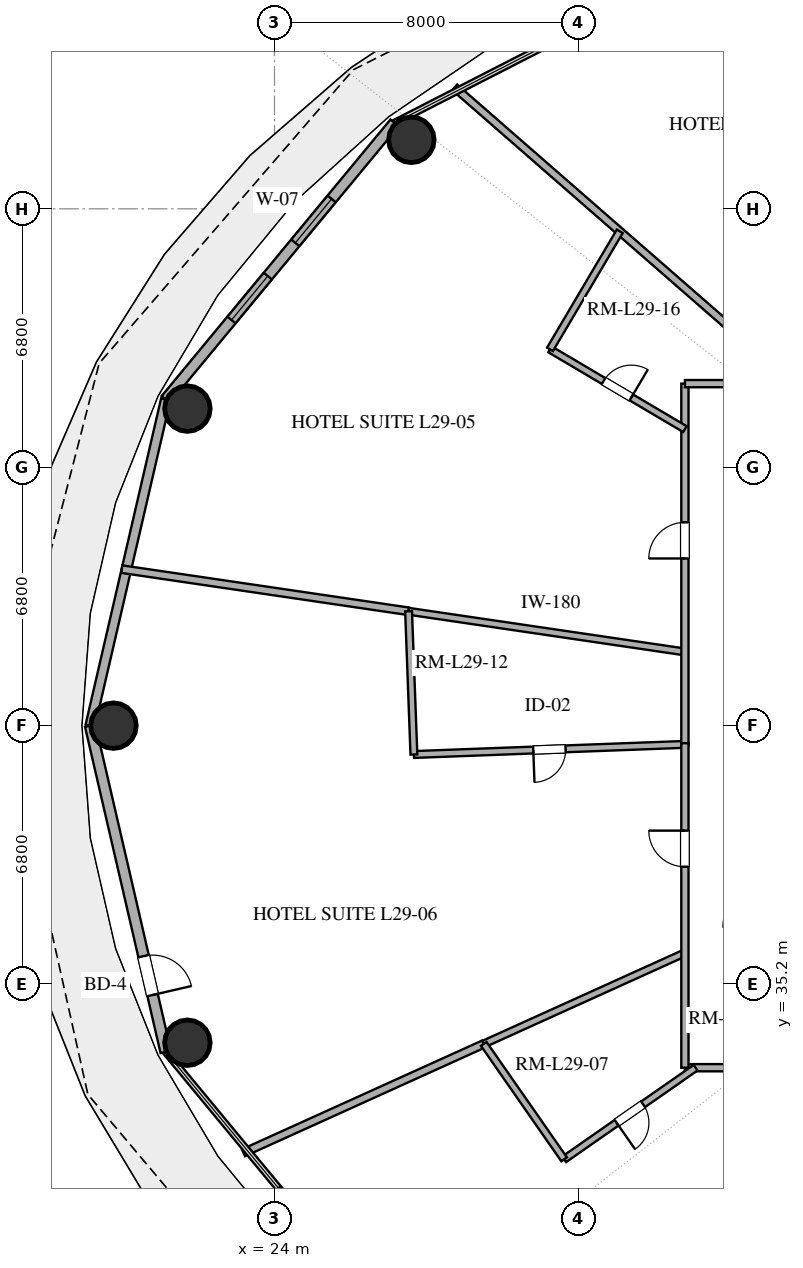
"""IFC4 building model, lengths in metres.
Left out: names, types, materials, properties, quantities, classifications, styles, units other than length and angle.
Written with IfcOpenShell. Run it as: python <this file> out.ifc"""

import sys

from ifc_helpers import new_model, si_unit, direction, frame, frame_2d, origin, origin_2d, place, context, subcontext, project, spatial, rectangle, hollow_circle, extrude, element, fill, save


model = new_model("IFC4")
c1 = context("Model", 3, precision=1e-05, world=origin(), true_north=direction((0.0, 1.0)))
c2 = subcontext(c1, "Body", "Model", "MODEL_VIEW")
j1 = project(units=[si_unit("LENGTHUNIT", "METRE"), si_unit("PLANEANGLEUNIT", "RADIAN")], contexts=[c1])
p1 = place(None, origin())
s1 = spatial("IfcSite", under=j1, at=p1, CompositionType="ELEMENT")
p2 = place(p1, origin())
s2 = spatial("IfcBuilding", under=s1, at=p2, CompositionType="ELEMENT")
p3 = place(p2, frame((0.0, 0.0, 116.4)))
s3 = spatial("IfcBuildingStorey", under=s2, at=p3, CompositionType="ELEMENT", Elevation=116.4)
for number, where, z_axis, x_axis in (
    (1, (27.602, 57.415, 0.0), (0.0, 0.0, 1.0), (1.0, 0.0, 0.0)),
    (2, (21.709, 50.343, 0.0), (0.0, 0.0, 1.0), (1.0, 0.0, 0.0)),
    (3, (19.763, 42.0, 0.0), (0.0, 0.0, 1.0), (1.0, 0.0, 0.0)),
    (4, (21.709, 33.657, 0.0), (0.0, 0.0, 1.0), (1.0, 0.0, 0.0)),
):
    element("IfcColumn", number, at=place(p3, frame(where, z_axis=z_axis, x_axis=x_axis)), inside=s3, PredefinedType="COLUMN", context=c2, shape_type="SweptSolid", body=[
        extrude(hollow_circle(Radius=0.6, WallThickness=0.032, at=origin_2d()), origin(), (0.0, 0.0, 1.0), 3.38),
    ])
p4 = place(p3, frame((27.16, 57.86, 0.0), z_axis=(0.0, 0.0, 1.0), x_axis=(-0.637505817448, -0.770445541696, 0.0)))
e5 = element("IfcWall", 5, at=p4, inside=s3, PredefinedType="SOLIDWALL", context=c2, shape_type="SweptSolid", body=[
    extrude(rectangle(XDim=9.445, YDim=0.28, at=frame_2d((4.723, 0.0))), origin(), (0.0, 0.0, 1.0), 3.38),
])
p5 = place(p4, frame((2.597, 0.0, 0.85)))
e6 = element("IfcOpeningElement", 6, at=p5, cuts=e5, PredefinedType="OPENING", context=c2, shape_type="SweptSolid", body=[
    extrude(rectangle(XDim=1.5, YDim=1.8, at=frame_2d((0.75, 0.9))), frame((0.0, 0.15, 0.0), z_axis=(0.0, -1.0, 0.0), x_axis=(1.0, 0.0, 0.0)), (0.0, 0.0, 1.0), 0.3),
])
p6 = place(p4, frame((5.232, 0.0, 0.85)))
e7 = element("IfcOpeningElement", 7, at=p6, cuts=e5, PredefinedType="OPENING", context=c2, shape_type="SweptSolid", body=[
    extrude(rectangle(XDim=1.5, YDim=1.8, at=frame_2d((0.75, 0.9))), frame((0.0, 0.15, 0.0), z_axis=(0.0, -1.0, 0.0), x_axis=(1.0, 0.0, 0.0)), (0.0, 0.0, 1.0), 0.3),
])
p7 = place(p3, frame((21.139, 50.583, 0.0), z_axis=(0.0, 0.0, 1.0), x_axis=(-0.22558597182, -0.974223264616, 0.0)))
e8 = element("IfcWall", 8, at=p7, inside=s3, PredefinedType="SOLIDWALL", context=c2, shape_type="SweptSolid", body=[
    extrude(rectangle(XDim=8.811, YDim=0.25, at=frame_2d((4.405, 0.0))), origin(), (0.0, 0.0, 1.0), 3.38),
])
p8 = place(p3, frame((19.151, 42.0, 0.0), z_axis=(0.0, 0.0, 1.0), x_axis=(0.22558597182, -0.974223264616, 0.0)))
e9 = element("IfcWall", 9, at=p8, inside=s3, PredefinedType="SOLIDWALL", context=c2, shape_type="SweptSolid", body=[
    extrude(rectangle(XDim=8.811, YDim=0.28, at=frame_2d((4.405, 0.0))), origin(), (0.0, 0.0, 1.0), 3.38),
])
p9 = place(p8, frame((6.225, 0.0, 0.0)))
e10 = element("IfcOpeningElement", 10, at=p9, cuts=e9, PredefinedType="OPENING", context=c2, shape_type="SweptSolid", body=[
    extrude(rectangle(XDim=1.05, YDim=2.2, at=frame_2d((0.525, 1.1))), frame((0.0, 0.15, 0.0), z_axis=(0.0, -1.0, 0.0), x_axis=(1.0, 0.0, 0.0)), (0.0, 0.0, 1.0), 0.3),
])
p10 = place(p3, frame((35.037, 21.969, 0.0), z_axis=(0.0, 0.0, 1.0), x_axis=(0.543298274368, 0.839539745973, 0.0)))
e11 = element("IfcWall", 11, at=p10, inside=s3, PredefinedType="PARTITIONING", context=c2, shape_type="SweptSolid", body=[
    extrude(rectangle(XDim=13.139, YDim=0.2, at=frame_2d((6.57, 0.0))), origin(), (0.0, 0.0, 1.0), 2.74),
])
p11 = place(p3, frame((19.982, 46.119, 0.0), z_axis=(0.0, 0.0, 1.0), x_axis=(0.989365774641, -0.14544883626, 0.0)))
e12 = element("IfcWall", 12, at=p11, inside=s3, PredefinedType="PARTITIONING", context=c2, shape_type="SweptSolid", body=[
    extrude(rectangle(XDim=7.627, YDim=0.2, at=frame_2d((3.813, 0.0))), origin(), (0.0, 0.0, 1.0), 2.74),
])
p12 = place(p3, frame((27.528, 45.01, 0.0), z_axis=(0.0, 0.0, 1.0), x_axis=(0.989364619243, -0.145456695238, 0.0)))
e13 = element("IfcWall", 13, at=p12, inside=s3, PredefinedType="PLUMBINGWALL", context=c2, shape_type="SweptSolid", body=[
    extrude(rectangle(XDim=7.35, YDim=0.18, at=frame_2d((3.675, 0.0))), origin(), (0.0, 0.0, 1.0), 2.74),
])
p13 = place(p3, frame((49.671, 33.0, 0.0), z_axis=(0.0, 0.0, 1.0), x_axis=(-1.0, 0.0, 0.0)))
e14 = element("IfcWall", 14, at=p13, inside=s3, PredefinedType="PARTITIONING", context=c2, shape_type="SweptSolid", body=[
    extrude(rectangle(XDim=14.871, YDim=0.19, at=frame_2d((7.436, 0.0))), origin(), (0.0, 0.0, 1.0), 2.74),
])
p14 = place(p13, frame((10.576, 0.0, 0.0)))
e15 = element("IfcOpeningElement", 15, at=p14, cuts=e14, PredefinedType="OPENING", context=c2, shape_type="SweptSolid", body=[
    extrude(rectangle(XDim=0.95, YDim=2.15, at=frame_2d((0.475, 1.075))), frame((0.0, 0.105, 0.0), z_axis=(0.0, -1.0, 0.0), x_axis=(1.0, 0.0, 0.0)), (0.0, 0.0, 1.0), 0.21),
])
p15 = place(p13, frame((4.101, 0.0, 0.0)))
e16 = element("IfcOpeningElement", 16, at=p15, cuts=e14, PredefinedType="OPENING", context=c2, shape_type="SweptSolid", body=[
    extrude(rectangle(XDim=1.0, YDim=2.2, at=frame_2d((0.5, 1.1))), frame((0.0, 0.105, 0.0), z_axis=(0.0, -1.0, 0.0), x_axis=(1.0, 0.0, 0.0)), (0.0, 0.0, 1.0), 0.21),
])
p16 = place(p3, frame((34.8, 41.508, 0.0), z_axis=(0.0, 0.0, 1.0), x_axis=(-0.999305711591, -0.037257144028, 0.0)))
e17 = element("IfcWall", 17, at=p16, inside=s3, PredefinedType="PLUMBINGWALL", context=c2, shape_type="SweptSolid", body=[
    extrude(rectangle(XDim=7.136, YDim=0.18, at=frame_2d((3.568, 0.0))), origin(), (0.0, 0.0, 1.0), 2.74),
])
p17 = place(p16, frame((3.143, 0.0, 0.0)))
e18 = element("IfcOpeningElement", 18, at=p17, cuts=e17, PredefinedType="OPENING", context=c2, shape_type="SweptSolid", body=[
    extrude(rectangle(XDim=0.85, YDim=2.1, at=frame_2d((0.425, 1.05))), frame((0.0, 0.1, 0.0), z_axis=(0.0, -1.0, 0.0), x_axis=(1.0, 0.0, 0.0)), (0.0, 0.0, 1.0), 0.2),
])
p18 = place(p3, frame((23.185, 30.762, 0.0), z_axis=(0.0, 0.0, 1.0), x_axis=(0.910940213411, 0.412538395292, 0.0)))
e19 = element("IfcWall", 19, at=p18, inside=s3, PredefinedType="PARTITIONING", context=c2, shape_type="SweptSolid", body=[
    extrude(rectangle(XDim=6.941, YDim=0.2, at=frame_2d((3.47, 0.0))), origin(), (0.0, 0.0, 1.0), 2.74),
])
p19 = place(p3, frame((37.68, 51.0, 0.0), z_axis=(0.0, 0.0, 1.0), x_axis=(-0.753659518717, 0.657265037749, 0.0)))
e20 = element("IfcWall", 20, at=p19, inside=s3, PredefinedType="PARTITIONING", context=c2, shape_type="SweptSolid", body=[
    extrude(rectangle(XDim=11.861, YDim=0.2, at=frame_2d((5.93, 0.0))), origin(), (0.0, 0.0, 1.0), 2.74),
])
p20 = place(p3, frame((34.8, 41.476, 0.0), z_axis=(0.0, 0.0, 1.0), x_axis=(0.0, 1.0, 0.0)))
e21 = element("IfcWall", 21, at=p20, inside=s3, PredefinedType="PARTITIONING", context=c2, shape_type="SweptSolid", body=[
    extrude(rectangle(XDim=9.524, YDim=0.19, at=frame_2d((4.762, 0.0))), origin(), (0.0, 0.0, 1.0), 2.74),
])
p21 = place(p20, frame((4.924, 0.0, 0.0)))
e22 = element("IfcOpeningElement", 22, at=p21, cuts=e21, PredefinedType="OPENING", context=c2, shape_type="SweptSolid", body=[
    extrude(rectangle(XDim=0.95, YDim=2.15, at=frame_2d((0.475, 1.075))), frame((0.0, 0.105, 0.0), z_axis=(0.0, -1.0, 0.0), x_axis=(1.0, 0.0, 0.0)), (0.0, 0.0, 1.0), 0.21),
])
p22 = place(p3, frame((34.8, 51.0, 0.0), z_axis=(0.0, 0.0, 1.0), x_axis=(1.0, 0.0, 0.0)))
e23 = element("IfcWall", 23, at=p22, inside=s3, PredefinedType="PARTITIONING", context=c2, shape_type="SweptSolid", body=[
    extrude(rectangle(XDim=10.622, YDim=0.19, at=frame_2d((5.311, 0.0))), origin(), (0.0, 0.0, 1.0), 2.74),
])
p23 = place(p22, frame((5.297, 0.0, 0.0)))
e24 = element("IfcOpeningElement", 24, at=p23, cuts=e23, PredefinedType="OPENING", context=c2, shape_type="SweptSolid", body=[
    extrude(rectangle(XDim=0.95, YDim=2.15, at=frame_2d((0.475, 1.075))), frame((0.0, 0.105, 0.0), z_axis=(0.0, -1.0, 0.0), x_axis=(1.0, 0.0, 0.0)), (0.0, 0.0, 1.0), 0.21),
])
p24 = place(p3, frame((29.507, 33.625, 0.0), z_axis=(0.0, 0.0, 1.0), x_axis=(0.910959840523, 0.412495053248, 0.0)))
e25 = element("IfcWall", 25, at=p24, inside=s3, PredefinedType="PLUMBINGWALL", context=c2, shape_type="SweptSolid", body=[
    extrude(rectangle(XDim=5.81, YDim=0.18, at=frame_2d((2.905, 0.0))), origin(), (0.0, 0.0, 1.0), 2.74),
])
p25 = place(p3, frame((34.8, 33.0, 0.0), z_axis=(0.0, 0.0, 1.0), x_axis=(0.0, 1.0, 0.0)))
e26 = element("IfcWall", 26, at=p25, inside=s3, PredefinedType="PARTITIONING", context=c2, shape_type="SweptSolid", body=[
    extrude(rectangle(XDim=8.54, YDim=0.19, at=frame_2d((4.27, 0.0))), origin(), (0.0, 0.0, 1.0), 2.74),
])
p26 = place(p25, frame((5.288, 0.0, 0.0)))
e27 = element("IfcOpeningElement", 27, at=p26, cuts=e26, PredefinedType="OPENING", context=c2, shape_type="SweptSolid", body=[
    extrude(rectangle(XDim=0.95, YDim=2.15, at=frame_2d((0.475, 1.075))), frame((0.0, 0.105, 0.0), z_axis=(0.0, -1.0, 0.0), x_axis=(1.0, 0.0, 0.0)), (0.0, 0.0, 1.0), 0.21),
])
p27 = place(p3, frame((35.081, 33.0, 0.0), z_axis=(0.0, 0.0, 1.0), x_axis=(-0.820508449427, -0.571634397512, 0.0)))
e28 = element("IfcWall", 28, at=p27, inside=s3, PredefinedType="PLUMBINGWALL", context=c2, shape_type="SweptSolid", body=[
    extrude(rectangle(XDim=4.216, YDim=0.18, at=frame_2d((2.108, 0.0))), origin(), (0.0, 0.0, 1.0), 2.74),
])
p28 = place(p27, frame((1.683, 0.0, 0.0)))
e29 = element("IfcOpeningElement", 29, at=p28, cuts=e28, PredefinedType="OPENING", context=c2, shape_type="SweptSolid", body=[
    extrude(rectangle(XDim=0.85, YDim=2.1, at=frame_2d((0.425, 1.05))), frame((0.0, 0.1, 0.0), z_axis=(0.0, -1.0, 0.0), x_axis=(1.0, 0.0, 0.0)), (0.0, 0.0, 1.0), 0.2),
])
p29 = place(p3, frame((31.25, 51.902, 0.0), z_axis=(0.0, 0.0, 1.0), x_axis=(0.860833406846, -0.508886869214, 0.0)))
e30 = element("IfcWall", 30, at=p29, inside=s3, PredefinedType="PLUMBINGWALL", context=c2, shape_type="SweptSolid", body=[
    extrude(rectangle(XDim=4.124, YDim=0.18, at=frame_2d((2.062, 0.0))), origin(), (0.0, 0.0, 1.0), 2.74),
])
p30 = place(p29, frame((1.637, 0.0, 0.0)))
e31 = element("IfcOpeningElement", 31, at=p30, cuts=e30, PredefinedType="OPENING", context=c2, shape_type="SweptSolid", body=[
    extrude(rectangle(XDim=0.85, YDim=2.1, at=frame_2d((0.425, 1.05))), frame((0.0, 0.1, 0.0), z_axis=(0.0, -1.0, 0.0), x_axis=(1.0, 0.0, 0.0)), (0.0, 0.0, 1.0), 0.2),
])
p31 = place(p3, frame((27.669, 41.242, 0.0), z_axis=(0.0, 0.0, 1.0), x_axis=(-0.037294239527, 0.999304327869, 0.0)))
e32 = element("IfcWall", 32, at=p31, inside=s3, PredefinedType="PLUMBINGWALL", context=c2, shape_type="SweptSolid", body=[
    extrude(rectangle(XDim=3.771, YDim=0.18, at=frame_2d((1.885, 0.0))), origin(), (0.0, 0.0, 1.0), 2.74),
])
p32 = place(p3, frame((31.622, 30.59, 0.0), z_axis=(0.0, 0.0, 1.0), x_axis=(-0.571609603384, 0.820525722521, 0.0)))
e33 = element("IfcWall", 33, at=p32, inside=s3, PredefinedType="PLUMBINGWALL", context=c2, shape_type="SweptSolid", body=[
    extrude(rectangle(XDim=3.7, YDim=0.18, at=frame_2d((1.85, 0.0))), origin(), (0.0, 0.0, 1.0), 2.74),
])
p33 = place(p3, frame((33.085, 55.007, 0.0), z_axis=(0.0, 0.0, 1.0), x_axis=(-0.508909491775, -0.860820032981, 0.0)))
e34 = element("IfcWall", 34, at=p33, inside=s3, PredefinedType="PLUMBINGWALL", context=c2, shape_type="SweptSolid", body=[
    extrude(rectangle(XDim=3.606, YDim=0.18, at=frame_2d((1.803, 0.0))), origin(), (0.0, 0.0, 1.0), 2.74),
])
p34 = place(p5, origin())
e35 = element("IfcWindow", 35, at=p34, inside=s3, PartitioningType="SINGLE_PANEL", PredefinedType="WINDOW", context=c2, shape_type="SweptSolid", body=[
    extrude(rectangle(XDim=1.5, YDim=1.8, at=frame_2d((0.75, 0.9))), frame((0.0, 0.03, 0.0), z_axis=(0.0, -1.0, 0.0), x_axis=(1.0, 0.0, 0.0)), (0.0, 0.0, 1.0), 0.06),
])
fill(e6, e35)
p35 = place(p6, origin())
e36 = element("IfcWindow", 36, at=p35, inside=s3, PartitioningType="SINGLE_PANEL", PredefinedType="WINDOW", context=c2, shape_type="SweptSolid", body=[
    extrude(rectangle(XDim=1.5, YDim=1.8, at=frame_2d((0.75, 0.9))), frame((0.0, 0.03, 0.0), z_axis=(0.0, -1.0, 0.0), x_axis=(1.0, 0.0, 0.0)), (0.0, 0.0, 1.0), 0.06),
])
fill(e7, e36)
p36 = place(p9, origin())
e37 = element("IfcDoor", 37, at=p36, inside=s3, OperationType="SINGLE_SWING_RIGHT", PredefinedType="DOOR", context=c2, shape_type="SweptSolid", body=[
    extrude(rectangle(XDim=1.05, YDim=2.2, at=frame_2d((0.525, 1.1))), frame((0.0, 0.025, 0.0), z_axis=(0.0, -1.0, 0.0), x_axis=(1.0, 0.0, 0.0)), (0.0, 0.0, 1.0), 0.05),
])
fill(e10, e37)
p37 = place(p17, origin())
e38 = element("IfcDoor", 38, at=p37, inside=s3, OperationType="SINGLE_SWING_RIGHT", PredefinedType="DOOR", context=c2, shape_type="SweptSolid", body=[
    extrude(rectangle(XDim=0.85, YDim=2.1, at=frame_2d((0.425, 1.05))), frame((0.0, 0.025, 0.0), z_axis=(0.0, -1.0, 0.0), x_axis=(1.0, 0.0, 0.0)), (0.0, 0.0, 1.0), 0.05),
])
fill(e18, e38)
p38 = place(p21, origin())
e39 = element("IfcDoor", 39, at=p38, inside=s3, OperationType="SINGLE_SWING_LEFT", PredefinedType="DOOR", context=c2, shape_type="SweptSolid", body=[
    extrude(rectangle(XDim=0.95, YDim=2.15, at=frame_2d((0.475, 1.075))), frame((0.0, 0.025, 0.0), z_axis=(0.0, -1.0, 0.0), x_axis=(1.0, 0.0, 0.0)), (0.0, 0.0, 1.0), 0.05),
])
fill(e22, e39)
p39 = place(p26, origin())
e40 = element("IfcDoor", 40, at=p39, inside=s3, OperationType="SINGLE_SWING_RIGHT", PredefinedType="DOOR", context=c2, shape_type="SweptSolid", body=[
    extrude(rectangle(XDim=0.95, YDim=2.15, at=frame_2d((0.475, 1.075))), frame((0.0, 0.025, 0.0), z_axis=(0.0, -1.0, 0.0), x_axis=(1.0, 0.0, 0.0)), (0.0, 0.0, 1.0), 0.05),
])
fill(e27, e40)
p40 = place(p28, origin())
e41 = element("IfcDoor", 41, at=p40, inside=s3, OperationType="SINGLE_SWING_RIGHT", PredefinedType="DOOR", context=c2, shape_type="SweptSolid", body=[
    extrude(rectangle(XDim=0.85, YDim=2.1, at=frame_2d((0.425, 1.05))), frame((0.0, 0.025, 0.0), z_axis=(0.0, -1.0, 0.0), x_axis=(1.0, 0.0, 0.0)), (0.0, 0.0, 1.0), 0.05),
])
fill(e29, e41)
p41 = place(p30, origin())
e42 = element("IfcDoor", 42, at=p41, inside=s3, OperationType="SINGLE_SWING_RIGHT", PredefinedType="DOOR", context=c2, shape_type="SweptSolid", body=[
    extrude(rectangle(XDim=0.85, YDim=2.1, at=frame_2d((0.425, 1.05))), frame((0.0, 0.025, 0.0), z_axis=(0.0, -1.0, 0.0), x_axis=(1.0, 0.0, 0.0)), (0.0, 0.0, 1.0), 0.05),
])
fill(e31, e42)
save(model, sys.argv[1])
